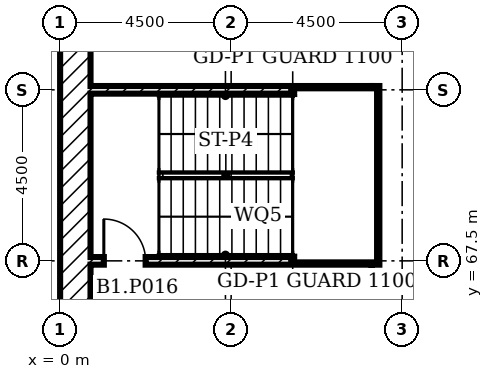
"""IFC4 building model, lengths in metres.
Left out: names, types, materials, properties, quantities, classifications, styles, units other than length and angle.
Written with IfcOpenShell. Run it as: python <this file> out.ifc"""

import sys

from ifc_helpers import new_model, si_unit, direction, frame, frame_2d, origin, place, context, subcontext, project, spatial, rectangle, extrude, element, fill, save


model = new_model("IFC4")
c1 = context("Model", 3, precision=1e-05, world=origin(), true_north=direction((0.0, 1.0)))
c2 = subcontext(c1, "Body", "Model", "MODEL_VIEW")
j1 = project(units=[si_unit("LENGTHUNIT", "METRE"), si_unit("PLANEANGLEUNIT", "RADIAN")], contexts=[c1])
p1 = place(None, origin())
s1 = spatial("IfcSite", under=j1, at=p1, CompositionType="ELEMENT")
p2 = place(p1, origin())
s2 = spatial("IfcBuilding", under=s1, at=p2, CompositionType="ELEMENT")
p3 = place(p2, frame((0.0, 0.0, -4.0)))
s3 = spatial("IfcBuildingStorey", under=s2, at=p3, CompositionType="ELEMENT", Elevation=-4.0)
p4 = place(p3, frame((0.4, 0.8, 0.0), z_axis=(0.0, 0.0, 1.0), x_axis=(0.0, 1.0, 0.0)))
e1 = element("IfcWall", 1, at=p4, inside=s3, PredefinedType="SOLIDWALL", context=c2, shape_type="SweptSolid", body=[
    extrude(rectangle(XDim=97.4, YDim=0.8, at=frame_2d((48.7, 0.0))), origin(), (0.0, 0.0, 1.0), 4.0),
])
p5 = place(p3, frame((8.3, 67.4, 0.0), z_axis=(0.0, 0.0, 1.0), x_axis=(0.0, 1.0, 0.0)))
e2 = element("IfcWall", 2, at=p5, inside=s3, PredefinedType="SOLIDWALL", context=c2, shape_type="SweptSolid", body=[
    extrude(rectangle(XDim=4.7, YDim=0.2, at=frame_2d((2.35, 0.0))), origin(), (0.0, 0.0, 1.0), 3.55),
])
p6 = place(p3, frame((0.8, 67.5, 0.0)))
e3 = element("IfcWall", 3, at=p6, inside=s3, PredefinedType="SOLIDWALL", context=c2, shape_type="SweptSolid", body=[
    extrude(rectangle(XDim=7.4, YDim=0.2, at=frame_2d((3.7, 0.0))), origin(), (0.0, 0.0, 1.0), 3.55),
])
p7 = place(p6, frame((0.35, 0.0, 0.0)))
e4 = element("IfcOpeningElement", 4, at=p7, cuts=e3, PredefinedType="OPENING", context=c2, shape_type="SweptSolid", body=[
    extrude(rectangle(XDim=1.1, YDim=2.1, at=frame_2d((0.55, 1.05))), frame((0.0, 0.11, 0.0), z_axis=(0.0, -1.0, 0.0), x_axis=(1.0, 0.0, 0.0)), (0.0, 0.0, 1.0), 0.22),
])
p8 = place(p3, frame((0.8, 72.0, 0.0)))
e5 = element("IfcWall", 5, at=p8, inside=s3, PredefinedType="SOLIDWALL", context=c2, shape_type="SweptSolid", body=[
    extrude(rectangle(XDim=7.4, YDim=0.2, at=frame_2d((3.7, 0.0))), origin(), (0.0, 0.0, 1.0), 3.55),
])
for number, where, z_axis, x_axis in (
    (6, (6.22, 71.9, -2.0), (0.0, 0.0, 1.0), (0.0, -1.0, 0.0)),
    (7, (7.6, 71.9, -2.0), (0.0, 0.0, 1.0), (0.0, -1.0, 0.0)),
):
    element("IfcWall", number, at=place(p3, frame(where, z_axis=z_axis, x_axis=x_axis)), inside=s3, PredefinedType="SOLIDWALL", context=c2, shape_type="SweptSolid", body=[
        extrude(rectangle(XDim=4.3, YDim=0.2, at=frame_2d((2.15, 0.0))), origin(), (0.0, 0.0, 1.0), 3.8),
    ])
p9 = place(p7, origin())
e8 = element("IfcDoor", 8, at=p9, inside=s3, OperationType="SINGLE_SWING_RIGHT", PredefinedType="DOOR", context=c2, shape_type="SweptSolid", body=[
    extrude(rectangle(XDim=1.1, YDim=2.1, at=frame_2d((0.55, 1.05))), frame((0.0, 0.025, 0.0), z_axis=(0.0, -1.0, 0.0), x_axis=(1.0, 0.0, 0.0)), (0.0, 0.0, 1.0), 0.05),
])
fill(e4, e8)
save(model, sys.argv[1])
